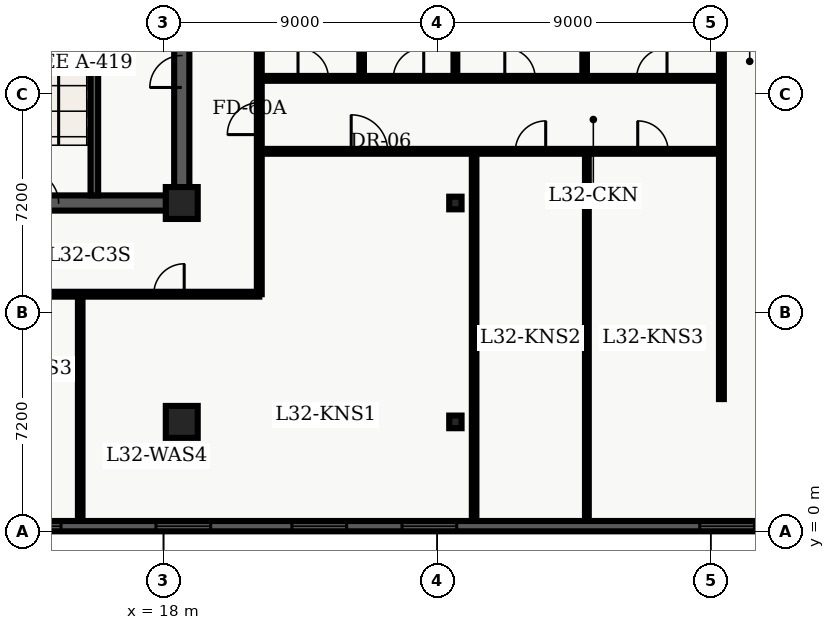
"""IFC4 building model, lengths in metres.
Left out: names, types, materials, properties, quantities, classifications, styles, units other than length and angle.
Written with IfcOpenShell. Run it as: python <this file> out.ifc"""

import sys

from ifc_helpers import new_model, entity, si_unit, converted_unit, direction, frame, origin_with_axes, origin_2d_with_axis, place, context, subcontext, project, spatial, polyline, rectangle, i_section, outline, extrude, element, fill, save


model = new_model("IFC4")
c1 = context("Model", 3, precision=1e-05, world=origin_with_axes(), true_north=direction((0.0, 1.0)))
c2 = subcontext(c1, "Body", "Model", "MODEL_VIEW")
j1 = project(units=[si_unit("LENGTHUNIT", "METRE"), converted_unit("PLANEANGLEUNIT", "DEGREE", entity("IfcPlaneAngleMeasure", 0.017), si_unit("PLANEANGLEUNIT", "RADIAN"), dimensions=[0, 0, 0, 0, 0, 0, 0])], contexts=[c1])
p1 = place(None, origin_with_axes())
s1 = spatial("IfcSite", under=j1, at=p1, CompositionType="ELEMENT")
p2 = place(p1, origin_with_axes())
s2 = spatial("IfcBuilding", under=s1, at=p2, CompositionType="ELEMENT")
p3 = place(p2, frame((0.0, 0.0, 132.9), z_axis=(0.0, 0.0, 1.0), x_axis=(1.0, 0.0, 0.0)))
s3 = spatial("IfcBuildingStorey", under=s2, at=p3, CompositionType="ELEMENT", Elevation=132.9)
p4 = place(p3, frame((11.4, 10.8, 0.0), z_axis=(0.0, 0.0, 1.0), x_axis=(1.0, 0.0, 0.0)))
e1 = element("IfcWall", 1, at=p4, inside=s3, PredefinedType="SHEAR", context=c2, shape_type="SweptSolid", body=[
    extrude(outline(polyline([(0.0, -0.25), (7.2, -0.25), (7.2, 0.25), (0.0, 0.25), (0.0, -0.25)])), origin_with_axes(), (0.0, 0.0, 1.0), 3.66),
])
p5 = place(p4, frame((2.625, 0.0, 0.0), z_axis=(0.0, 0.0, 1.0), x_axis=(1.0, 0.0, 0.0)))
e2 = element("IfcOpeningElement", 2, at=p5, cuts=e1, PredefinedType="OPENING", context=c2, shape_type="SweptSolid", body=[
    extrude(rectangle(XDim=1.05, YDim=0.52, at=origin_2d_with_axis()), origin_with_axes(), (0.0, 0.0, 1.0), 2.15),
])
p6 = place(p3, frame((18.6, 10.8, 0.0), z_axis=(0.0, 0.0, 1.0), x_axis=(0.0, 1.0, 0.0)))
e3 = element("IfcWall", 3, at=p6, inside=s3, PredefinedType="SHEAR", context=c2, shape_type="SweptSolid", body=[
    extrude(outline(polyline([(0.0, -0.25), (13.5, -0.25), (13.5, 0.25), (0.0, 0.25), (0.0, -0.25)])), origin_with_axes(), (0.0, 0.0, 1.0), 3.66),
])
p7 = place(p6, frame((11.125, 0.0, 0.0), z_axis=(0.0, 0.0, 1.0), x_axis=(1.0, 0.0, 0.0)))
e4 = element("IfcOpeningElement", 4, at=p7, cuts=e3, PredefinedType="OPENING", context=c2, shape_type="SweptSolid", body=[
    extrude(rectangle(XDim=1.05, YDim=0.52, at=origin_2d_with_axis()), origin_with_axes(), (0.0, 0.0, 1.0), 2.15),
])
p8 = place(p6, frame((4.325, 0.0, 0.0), z_axis=(0.0, 0.0, 1.0), x_axis=(1.0, 0.0, 0.0)))
e5 = element("IfcOpeningElement", 5, at=p8, cuts=e3, PredefinedType="OPENING", context=c2, shape_type="SweptSolid", body=[
    extrude(rectangle(XDim=1.05, YDim=0.52, at=origin_2d_with_axis()), origin_with_axes(), (0.0, 0.0, 1.0), 2.15),
])
p9 = place(p3, frame((15.725, 11.05, 0.0), z_axis=(0.0, 0.0, 1.0), x_axis=(0.0, 1.0, 0.0)))
e6 = element("IfcWall", 6, at=p9, inside=s3, PredefinedType="SHEAR", context=c2, shape_type="SweptSolid", body=[
    extrude(outline(polyline([(0.0, -0.125), (8.65, -0.125), (8.65, 0.125), (0.0, 0.125), (0.0, -0.125)])), origin_with_axes(), (0.0, 0.0, 1.0), 3.66),
])
for number, where, z_axis, x_axis in (
    (7, (18.6, 3.6, 0.0), (0.0, 0.0, 1.0), (1.0, 0.0, 0.0)),
    (8, (18.6, 10.8, 0.0), (0.0, 0.0, 1.0), (1.0, 0.0, 0.0)),
):
    element("IfcColumn", number, at=place(p3, frame(where, z_axis=z_axis, x_axis=x_axis)), inside=s3, PredefinedType="COLUMN", context=c2, shape_type="SweptSolid", body=[
        extrude(rectangle(XDim=1.05, YDim=1.05, at=origin_2d_with_axis()), origin_with_axes(), (0.0, 0.0, 1.0), 3.9),
    ])
for number, where, z_axis, x_axis in (
    (9, (27.6, 3.6, 0.0), (0.0, 0.0, 1.0), (1.0, 0.0, 0.0)),
    (10, (27.6, 10.8, 0.0), (0.0, 0.0, 1.0), (1.0, 0.0, 0.0)),
):
    element("IfcColumn", number, at=place(p3, frame(where, z_axis=z_axis, x_axis=x_axis)), inside=s3, PredefinedType="COLUMN", context=c2, shape_type="SweptSolid", body=[
        extrude(i_section(OverallWidth=0.406, OverallDepth=0.416, WebThickness=0.03, FlangeThickness=0.048, FilletRadius=0.022, at=origin_2d_with_axis()), origin_with_axes(), (0.0, 0.0, 1.0), 3.9),
    ])
p10 = place(p3, frame((2.6, 7.8, 0.0), z_axis=(0.0, 0.0, 1.0), x_axis=(1.0, 0.0, 0.0)))
e11 = element("IfcWall", 11, at=p10, inside=s3, PredefinedType="PARTITIONING", context=c2, shape_type="SweptSolid", body=[
    extrude(outline(polyline([(0.0, -0.08), (18.55, -0.08), (18.55, 0.08), (0.0, 0.08), (0.0, -0.08)])), origin_with_axes(), (0.0, 0.0, 1.0), 2.7),
])
p11 = place(p10, frame((1.55, 0.0, 0.0), z_axis=(0.0, 0.0, 1.0), x_axis=(1.0, 0.0, 0.0)))
e12 = element("IfcOpeningElement", 12, at=p11, cuts=e11, PredefinedType="OPENING", context=c2, shape_type="SweptSolid", body=[
    extrude(rectangle(XDim=1.0, YDim=0.18, at=origin_2d_with_axis()), origin_with_axes(), (0.0, 0.0, 1.0), 2.15),
])
p12 = place(p10, frame((6.235, 0.0, 0.0), z_axis=(0.0, 0.0, 1.0), x_axis=(1.0, 0.0, 0.0)))
e13 = element("IfcOpeningElement", 13, at=p12, cuts=e11, PredefinedType="OPENING", context=c2, shape_type="SweptSolid", body=[
    extrude(rectangle(XDim=1.0, YDim=0.18, at=origin_2d_with_axis()), origin_with_axes(), (0.0, 0.0, 1.0), 2.15),
])
p13 = place(p10, frame((10.73, 0.0, 0.0), z_axis=(0.0, 0.0, 1.0), x_axis=(1.0, 0.0, 0.0)))
e14 = element("IfcOpeningElement", 14, at=p13, cuts=e11, PredefinedType="OPENING", context=c2, shape_type="SweptSolid", body=[
    extrude(rectangle(XDim=1.0, YDim=0.18, at=origin_2d_with_axis()), origin_with_axes(), (0.0, 0.0, 1.0), 2.15),
])
p14 = place(p10, frame((15.58, 0.0, 0.0), z_axis=(0.0, 0.0, 1.0), x_axis=(1.0, 0.0, 0.0)))
e15 = element("IfcOpeningElement", 15, at=p14, cuts=e11, PredefinedType="OPENING", context=c2, shape_type="SweptSolid", body=[
    extrude(rectangle(XDim=1.0, YDim=0.18, at=origin_2d_with_axis()), origin_with_axes(), (0.0, 0.0, 1.0), 2.15),
])
p15 = place(p3, frame((21.15, 7.8, 0.0), z_axis=(0.0, 0.0, 1.0), x_axis=(0.0, 1.0, 0.0)))
e16 = element("IfcWall", 16, at=p15, inside=s3, PredefinedType="PARTITIONING", context=c2, shape_type="SweptSolid", body=[
    extrude(outline(polyline([(0.0, -0.08), (32.7, -0.08), (32.7, 0.08), (0.0, 0.08), (0.0, -0.08)])), origin_with_axes(), (0.0, 0.0, 1.0), 2.7),
])
p16 = place(p15, frame((5.775, 0.0, 0.0), z_axis=(0.0, 0.0, 1.0), x_axis=(1.0, 0.0, 0.0)))
e17 = element("IfcOpeningElement", 17, at=p16, cuts=e16, PredefinedType="OPENING", context=c2, shape_type="SweptSolid", body=[
    extrude(rectangle(XDim=1.05, YDim=0.18, at=origin_2d_with_axis()), origin_with_axes(), (0.0, 0.0, 1.0), 2.15),
])
p17 = place(p3, frame((15.26, 0.335, 0.0), z_axis=(0.0, 0.0, 1.0), x_axis=(0.0, 1.0, 0.0)))
e18 = element("IfcWall", 18, at=p17, inside=s3, PredefinedType="PARTITIONING", context=c2, shape_type="SweptSolid", body=[
    extrude(outline(polyline([(0.0, -0.075), (7.365, -0.075), (7.365, 0.075), (0.0, 0.075), (0.0, -0.075)])), origin_with_axes(), (0.0, 0.0, 1.0), 2.7),
])
p18 = place(p3, frame((21.15, 12.5, 0.0), z_axis=(0.0, 0.0, 1.0), x_axis=(1.0, 0.0, 0.0)))
e19 = element("IfcWall", 19, at=p18, inside=s3, PredefinedType="PARTITIONING", context=c2, shape_type="SweptSolid", body=[
    extrude(outline(polyline([(0.0, -0.08), (15.2, -0.08), (15.2, 0.08), (0.0, 0.08), (0.0, -0.08)])), origin_with_axes(), (0.0, 0.0, 1.0), 2.7),
])
p19 = place(p18, frame((3.623, 0.0, 0.0), z_axis=(0.0, 0.0, 1.0), x_axis=(1.0, 0.0, 0.0)))
e20 = element("IfcOpeningElement", 20, at=p19, cuts=e19, PredefinedType="OPENING", context=c2, shape_type="SweptSolid", body=[
    extrude(rectangle(XDim=1.2, YDim=0.18, at=origin_2d_with_axis()), origin_with_axes(), (0.0, 0.0, 1.0), 2.2),
])
p20 = place(p18, frame((8.921, 0.0, 0.0), z_axis=(0.0, 0.0, 1.0), x_axis=(1.0, 0.0, 0.0)))
e21 = element("IfcOpeningElement", 21, at=p20, cuts=e19, PredefinedType="OPENING", context=c2, shape_type="SweptSolid", body=[
    extrude(rectangle(XDim=1.0, YDim=0.18, at=origin_2d_with_axis()), origin_with_axes(), (0.0, 0.0, 1.0), 2.15),
])
p21 = place(p18, frame((12.947, 0.0, 0.0), z_axis=(0.0, 0.0, 1.0), x_axis=(1.0, 0.0, 0.0)))
e22 = element("IfcOpeningElement", 22, at=p21, cuts=e19, PredefinedType="OPENING", context=c2, shape_type="SweptSolid", body=[
    extrude(rectangle(XDim=1.0, YDim=0.18, at=origin_2d_with_axis()), origin_with_axes(), (0.0, 0.0, 1.0), 2.15),
])
p22 = place(p3, frame((21.15, 14.9, 0.0), z_axis=(0.0, 0.0, 1.0), x_axis=(1.0, 0.0, 0.0)))
e23 = element("IfcWall", 23, at=p22, inside=s3, PredefinedType="PARTITIONING", context=c2, shape_type="SweptSolid", body=[
    extrude(outline(polyline([(0.0, -0.08), (15.2, -0.08), (15.2, 0.08), (0.0, 0.08), (0.0, -0.08)])), origin_with_axes(), (0.0, 0.0, 1.0), 2.7),
])
p23 = place(p22, frame((1.774, 0.0, 0.0), z_axis=(0.0, 0.0, 1.0), x_axis=(1.0, 0.0, 0.0)))
e24 = element("IfcOpeningElement", 24, at=p23, cuts=e23, PredefinedType="OPENING", context=c2, shape_type="SweptSolid", body=[
    extrude(rectangle(XDim=1.0, YDim=0.18, at=origin_2d_with_axis()), origin_with_axes(), (0.0, 0.0, 1.0), 2.15),
])
p24 = place(p22, frame((4.909, 0.0, 0.0), z_axis=(0.0, 0.0, 1.0), x_axis=(1.0, 0.0, 0.0)))
e25 = element("IfcOpeningElement", 25, at=p24, cuts=e23, PredefinedType="OPENING", context=c2, shape_type="SweptSolid", body=[
    extrude(rectangle(XDim=1.0, YDim=0.18, at=origin_2d_with_axis()), origin_with_axes(), (0.0, 0.0, 1.0), 2.15),
])
p25 = place(p22, frame((8.575, 0.0, 0.0), z_axis=(0.0, 0.0, 1.0), x_axis=(1.0, 0.0, 0.0)))
e26 = element("IfcOpeningElement", 26, at=p25, cuts=e23, PredefinedType="OPENING", context=c2, shape_type="SweptSolid", body=[
    extrude(rectangle(XDim=1.0, YDim=0.18, at=origin_2d_with_axis()), origin_with_axes(), (0.0, 0.0, 1.0), 2.15),
])
p26 = place(p22, frame((12.911, 0.0, 0.0), z_axis=(0.0, 0.0, 1.0), x_axis=(1.0, 0.0, 0.0)))
e27 = element("IfcOpeningElement", 27, at=p26, cuts=e23, PredefinedType="OPENING", context=c2, shape_type="SweptSolid", body=[
    extrude(rectangle(XDim=1.0, YDim=0.18, at=origin_2d_with_axis()), origin_with_axes(), (0.0, 0.0, 1.0), 2.15),
])
p27 = place(p3, frame((36.35, 4.35, 0.0), z_axis=(0.0, 0.0, 1.0), x_axis=(0.0, 1.0, 0.0)))
e28 = element("IfcWall", 28, at=p27, inside=s3, PredefinedType="PARTITIONING", context=c2, shape_type="SweptSolid", body=[
    extrude(outline(polyline([(0.0, -0.08), (16.95, -0.08), (16.95, 0.08), (0.0, 0.08), (0.0, -0.08)])), origin_with_axes(), (0.0, 0.0, 1.0), 2.7),
])
p28 = place(p3, frame((28.216, 0.335, 0.0), z_axis=(0.0, 0.0, 1.0), x_axis=(0.0, 1.0, 0.0)))
e29 = element("IfcWall", 29, at=p28, inside=s3, PredefinedType="PARTITIONING", context=c2, shape_type="SweptSolid", body=[
    extrude(outline(polyline([(0.0, -0.075), (12.045, -0.075), (12.045, 0.075), (0.0, 0.075), (0.0, -0.075)])), origin_with_axes(), (0.0, 0.0, 1.0), 2.7),
])
p29 = place(p3, frame((31.925, 0.335, 0.0), z_axis=(0.0, 0.0, 1.0), x_axis=(0.0, 1.0, 0.0)))
e30 = element("IfcWall", 30, at=p29, inside=s3, PredefinedType="PARTITIONING", context=c2, shape_type="SweptSolid", body=[
    extrude(outline(polyline([(0.0, -0.062), (12.045, -0.062), (12.045, 0.062), (0.0, 0.062), (0.0, -0.062)])), origin_with_axes(), (0.0, 0.0, 1.0), 2.7),
])
p30 = place(p3, frame((24.517, 15.02, 0.0), z_axis=(0.0, 0.0, 1.0), x_axis=(0.0, 1.0, 0.0)))
e31 = element("IfcWall", 31, at=p30, inside=s3, PredefinedType="PARTITIONING", context=c2, shape_type="SweptSolid", body=[
    extrude(outline(polyline([(0.0, -0.075), (6.245, -0.075), (6.245, 0.075), (0.0, 0.075), (0.0, -0.075)])), origin_with_axes(), (0.0, 0.0, 1.0), 2.7),
])
p31 = place(p3, frame((27.6, 15.02, 0.0), z_axis=(0.0, 0.0, 1.0), x_axis=(0.0, 1.0, 0.0)))
e32 = element("IfcWall", 32, at=p31, inside=s3, PredefinedType="PARTITIONING", context=c2, shape_type="SweptSolid", body=[
    extrude(outline(polyline([(0.0, -0.062), (6.245, -0.062), (6.245, 0.062), (0.0, 0.062), (0.0, -0.062)])), origin_with_axes(), (0.0, 0.0, 1.0), 2.7),
])
p32 = place(p3, frame((31.851, 15.02, 0.0), z_axis=(0.0, 0.0, 1.0), x_axis=(0.0, 1.0, 0.0)))
e33 = element("IfcWall", 33, at=p32, inside=s3, PredefinedType="PARTITIONING", context=c2, shape_type="SweptSolid", body=[
    extrude(outline(polyline([(0.0, -0.075), (6.245, -0.075), (6.245, 0.075), (0.0, 0.075), (0.0, -0.075)])), origin_with_axes(), (0.0, 0.0, 1.0), 2.7),
])
p33 = place(p3, frame((57.26, 0.17, 0.0), z_axis=(0.0, 0.0, 1.0), x_axis=(-1.0, 0.0, 0.0)))
e34 = element("IfcWall", 34, at=p33, inside=s3, PredefinedType="SOLIDWALL", context=c2, shape_type="SweptSolid", body=[
    extrude(outline(polyline([(0.0, -0.17), (54.86, -0.17), (54.86, 0.17), (0.0, 0.17), (0.0, -0.17)])), origin_with_axes(), (0.0, 0.0, 1.0), 3.66),
])
p34 = place(p33, frame((2.836, 0.0, 0.45), z_axis=(0.0, 0.0, 1.0), x_axis=(1.0, 0.0, 0.0)))
e35 = element("IfcOpeningElement", 35, at=p34, cuts=e34, PredefinedType="OPENING", context=c2, shape_type="SweptSolid", body=[
    extrude(rectangle(XDim=1.8, YDim=0.36, at=origin_2d_with_axis()), origin_with_axes(), (0.0, 0.0, 1.0), 2.1),
])
p35 = place(p33, frame((7.307, 0.0, 0.45), z_axis=(0.0, 0.0, 1.0), x_axis=(1.0, 0.0, 0.0)))
e36 = element("IfcOpeningElement", 36, at=p35, cuts=e34, PredefinedType="OPENING", context=c2, shape_type="SweptSolid", body=[
    extrude(rectangle(XDim=1.8, YDim=0.36, at=origin_2d_with_axis()), origin_with_axes(), (0.0, 0.0, 1.0), 2.1),
])
p36 = place(p33, frame((11.779, 0.0, 0.45), z_axis=(0.0, 0.0, 1.0), x_axis=(1.0, 0.0, 0.0)))
e37 = element("IfcOpeningElement", 37, at=p36, cuts=e34, PredefinedType="OPENING", context=c2, shape_type="SweptSolid", body=[
    extrude(rectangle(XDim=1.8, YDim=0.36, at=origin_2d_with_axis()), origin_with_axes(), (0.0, 0.0, 1.0), 2.1),
])
p37 = place(p33, frame((16.251, 0.0, 0.45), z_axis=(0.0, 0.0, 1.0), x_axis=(1.0, 0.0, 0.0)))
e38 = element("IfcOpeningElement", 38, at=p37, cuts=e34, PredefinedType="OPENING", context=c2, shape_type="SweptSolid", body=[
    extrude(rectangle(XDim=1.8, YDim=0.36, at=origin_2d_with_axis()), origin_with_axes(), (0.0, 0.0, 1.0), 2.1),
])
p38 = place(p33, frame((20.723, 0.0, 0.45), z_axis=(0.0, 0.0, 1.0), x_axis=(1.0, 0.0, 0.0)))
e39 = element("IfcOpeningElement", 39, at=p38, cuts=e34, PredefinedType="OPENING", context=c2, shape_type="SweptSolid", body=[
    extrude(rectangle(XDim=1.8, YDim=0.36, at=origin_2d_with_axis()), origin_with_axes(), (0.0, 0.0, 1.0), 2.1),
])
p39 = place(p33, frame((30.516, 0.0, 0.45), z_axis=(0.0, 0.0, 1.0), x_axis=(1.0, 0.0, 0.0)))
e40 = element("IfcOpeningElement", 40, at=p39, cuts=e34, PredefinedType="OPENING", context=c2, shape_type="SweptSolid", body=[
    extrude(rectangle(XDim=1.8, YDim=0.36, at=origin_2d_with_axis()), origin_with_axes(), (0.0, 0.0, 1.0), 2.1),
])
p40 = place(p33, frame((34.138, 0.0, 0.45), z_axis=(0.0, 0.0, 1.0), x_axis=(1.0, 0.0, 0.0)))
e41 = element("IfcOpeningElement", 41, at=p40, cuts=e34, PredefinedType="OPENING", context=c2, shape_type="SweptSolid", body=[
    extrude(rectangle(XDim=1.8, YDim=0.36, at=origin_2d_with_axis()), origin_with_axes(), (0.0, 0.0, 1.0), 2.1),
])
p41 = place(p33, frame((38.609, 0.0, 0.45), z_axis=(0.0, 0.0, 1.0), x_axis=(1.0, 0.0, 0.0)))
e42 = element("IfcOpeningElement", 42, at=p41, cuts=e34, PredefinedType="OPENING", context=c2, shape_type="SweptSolid", body=[
    extrude(rectangle(XDim=1.8, YDim=0.36, at=origin_2d_with_axis()), origin_with_axes(), (0.0, 0.0, 1.0), 2.1),
])
p42 = place(p33, frame((43.531, 0.0, 0.45), z_axis=(0.0, 0.0, 1.0), x_axis=(1.0, 0.0, 0.0)))
e43 = element("IfcOpeningElement", 43, at=p42, cuts=e34, PredefinedType="OPENING", context=c2, shape_type="SweptSolid", body=[
    extrude(rectangle(XDim=1.8, YDim=0.36, at=origin_2d_with_axis()), origin_with_axes(), (0.0, 0.0, 1.0), 2.1),
])
p43 = place(p33, frame((47.553, 0.0, 0.45), z_axis=(0.0, 0.0, 1.0), x_axis=(1.0, 0.0, 0.0)))
e44 = element("IfcOpeningElement", 44, at=p43, cuts=e34, PredefinedType="OPENING", context=c2, shape_type="SweptSolid", body=[
    extrude(rectangle(XDim=1.8, YDim=0.36, at=origin_2d_with_axis()), origin_with_axes(), (0.0, 0.0, 1.0), 2.1),
])
p44 = place(p33, frame((52.474, 0.0, 0.45), z_axis=(0.0, 0.0, 1.0), x_axis=(1.0, 0.0, 0.0)))
e45 = element("IfcOpeningElement", 45, at=p44, cuts=e34, PredefinedType="OPENING", context=c2, shape_type="SweptSolid", body=[
    extrude(rectangle(XDim=1.8, YDim=0.36, at=origin_2d_with_axis()), origin_with_axes(), (0.0, 0.0, 1.0), 2.1),
])
p45 = place(p4, frame((2.625, 0.0, 0.0), z_axis=(0.0, 0.0, 1.0), x_axis=(1.0, 0.0, 0.0)))
e46 = element("IfcDoor", 46, at=p45, inside=s3, OperationType="SINGLE_SWING_LEFT", PredefinedType="DOOR", context=c2, shape_type="SweptSolid", body=[
    extrude(rectangle(XDim=1.05, YDim=0.09, at=origin_2d_with_axis()), origin_with_axes(), (0.0, 0.0, 1.0), 2.15),
])
fill(e2, e46)
p46 = place(p6, frame((4.325, 0.0, 0.0), z_axis=(0.0, 0.0, 1.0), x_axis=(1.0, 0.0, 0.0)))
e47 = element("IfcDoor", 47, at=p46, inside=s3, OperationType="SINGLE_SWING_LEFT", PredefinedType="DOOR", context=c2, shape_type="SweptSolid", body=[
    extrude(rectangle(XDim=1.05, YDim=0.09, at=origin_2d_with_axis()), origin_with_axes(), (0.0, 0.0, 1.0), 2.15),
])
fill(e5, e47)
p47 = place(p10, frame((15.58, 0.0, 0.0), z_axis=(0.0, 0.0, 1.0), x_axis=(1.0, 0.0, 0.0)))
e48 = element("IfcDoor", 48, at=p47, inside=s3, OperationType="SINGLE_SWING_RIGHT", PredefinedType="DOOR", context=c2, shape_type="SweptSolid", body=[
    extrude(rectangle(XDim=1.0, YDim=0.09, at=origin_2d_with_axis()), origin_with_axes(), (0.0, 0.0, 1.0), 2.15),
])
fill(e15, e48)
p48 = place(p15, frame((5.775, 0.0, 0.0), z_axis=(0.0, 0.0, 1.0), x_axis=(1.0, 0.0, 0.0)))
e49 = element("IfcDoor", 49, at=p48, inside=s3, OperationType="SINGLE_SWING_LEFT", PredefinedType="DOOR", context=c2, shape_type="SweptSolid", body=[
    extrude(rectangle(XDim=1.05, YDim=0.09, at=origin_2d_with_axis()), origin_with_axes(), (0.0, 0.0, 1.0), 2.15),
])
fill(e17, e49)
p49 = place(p18, frame((3.623, 0.0, 0.0), z_axis=(0.0, 0.0, 1.0), x_axis=(1.0, 0.0, 0.0)))
e50 = element("IfcDoor", 50, at=p49, inside=s3, OperationType="SINGLE_SWING_LEFT", PredefinedType="DOOR", context=c2, shape_type="SweptSolid", body=[
    extrude(rectangle(XDim=1.2, YDim=0.09, at=origin_2d_with_axis()), origin_with_axes(), (0.0, 0.0, 1.0), 2.2),
])
fill(e20, e50)
p50 = place(p18, frame((8.921, 0.0, 0.0), z_axis=(0.0, 0.0, 1.0), x_axis=(1.0, 0.0, 0.0)))
e51 = element("IfcDoor", 51, at=p50, inside=s3, OperationType="SINGLE_SWING_RIGHT", PredefinedType="DOOR", context=c2, shape_type="SweptSolid", body=[
    extrude(rectangle(XDim=1.0, YDim=0.09, at=origin_2d_with_axis()), origin_with_axes(), (0.0, 0.0, 1.0), 2.15),
])
fill(e21, e51)
p51 = place(p18, frame((12.947, 0.0, 0.0), z_axis=(0.0, 0.0, 1.0), x_axis=(1.0, 0.0, 0.0)))
e52 = element("IfcDoor", 52, at=p51, inside=s3, OperationType="SINGLE_SWING_LEFT", PredefinedType="DOOR", context=c2, shape_type="SweptSolid", body=[
    extrude(rectangle(XDim=1.0, YDim=0.09, at=origin_2d_with_axis()), origin_with_axes(), (0.0, 0.0, 1.0), 2.15),
])
fill(e22, e52)
p52 = place(p22, frame((1.774, 0.0, 0.0), z_axis=(0.0, 0.0, 1.0), x_axis=(1.0, 0.0, 0.0)))
e53 = element("IfcDoor", 53, at=p52, inside=s3, OperationType="SINGLE_SWING_LEFT", PredefinedType="DOOR", context=c2, shape_type="SweptSolid", body=[
    extrude(rectangle(XDim=1.0, YDim=0.09, at=origin_2d_with_axis()), origin_with_axes(), (0.0, 0.0, 1.0), 2.15),
])
fill(e24, e53)
p53 = place(p22, frame((4.909, 0.0, 0.0), z_axis=(0.0, 0.0, 1.0), x_axis=(1.0, 0.0, 0.0)))
e54 = element("IfcDoor", 54, at=p53, inside=s3, OperationType="SINGLE_SWING_RIGHT", PredefinedType="DOOR", context=c2, shape_type="SweptSolid", body=[
    extrude(rectangle(XDim=1.0, YDim=0.09, at=origin_2d_with_axis()), origin_with_axes(), (0.0, 0.0, 1.0), 2.15),
])
fill(e25, e54)
p54 = place(p22, frame((8.575, 0.0, 0.0), z_axis=(0.0, 0.0, 1.0), x_axis=(1.0, 0.0, 0.0)))
e55 = element("IfcDoor", 55, at=p54, inside=s3, OperationType="SINGLE_SWING_LEFT", PredefinedType="DOOR", context=c2, shape_type="SweptSolid", body=[
    extrude(rectangle(XDim=1.0, YDim=0.09, at=origin_2d_with_axis()), origin_with_axes(), (0.0, 0.0, 1.0), 2.15),
])
fill(e26, e55)
p55 = place(p22, frame((12.911, 0.0, 0.0), z_axis=(0.0, 0.0, 1.0), x_axis=(1.0, 0.0, 0.0)))
e56 = element("IfcDoor", 56, at=p55, inside=s3, OperationType="SINGLE_SWING_RIGHT", PredefinedType="DOOR", context=c2, shape_type="SweptSolid", body=[
    extrude(rectangle(XDim=1.0, YDim=0.09, at=origin_2d_with_axis()), origin_with_axes(), (0.0, 0.0, 1.0), 2.15),
])
fill(e27, e56)
p56 = place(p33, frame((20.723, 0.0, 0.45), z_axis=(0.0, 0.0, 1.0), x_axis=(1.0, 0.0, 0.0)))
e57 = element("IfcWindow", 57, at=p56, inside=s3, PredefinedType="WINDOW", context=c2, shape_type="SweptSolid", body=[
    extrude(rectangle(XDim=1.8, YDim=0.09, at=origin_2d_with_axis()), origin_with_axes(), (0.0, 0.0, 1.0), 2.1),
])
fill(e39, e57)
p57 = place(p33, frame((30.516, 0.0, 0.45), z_axis=(0.0, 0.0, 1.0), x_axis=(1.0, 0.0, 0.0)))
e58 = element("IfcWindow", 58, at=p57, inside=s3, PredefinedType="WINDOW", context=c2, shape_type="SweptSolid", body=[
    extrude(rectangle(XDim=1.8, YDim=0.09, at=origin_2d_with_axis()), origin_with_axes(), (0.0, 0.0, 1.0), 2.1),
])
fill(e40, e58)
p58 = place(p33, frame((34.138, 0.0, 0.45), z_axis=(0.0, 0.0, 1.0), x_axis=(1.0, 0.0, 0.0)))
e59 = element("IfcWindow", 59, at=p58, inside=s3, PredefinedType="WINDOW", context=c2, shape_type="SweptSolid", body=[
    extrude(rectangle(XDim=1.8, YDim=0.09, at=origin_2d_with_axis()), origin_with_axes(), (0.0, 0.0, 1.0), 2.1),
])
fill(e41, e59)
p59 = place(p33, frame((38.609, 0.0, 0.45), z_axis=(0.0, 0.0, 1.0), x_axis=(1.0, 0.0, 0.0)))
e60 = element("IfcWindow", 60, at=p59, inside=s3, PredefinedType="WINDOW", context=c2, shape_type="SweptSolid", body=[
    extrude(rectangle(XDim=1.8, YDim=0.09, at=origin_2d_with_axis()), origin_with_axes(), (0.0, 0.0, 1.0), 2.1),
])
fill(e42, e60)
p60 = place(p33, frame((43.531, 0.0, 0.45), z_axis=(0.0, 0.0, 1.0), x_axis=(1.0, 0.0, 0.0)))
e61 = element("IfcWindow", 61, at=p60, inside=s3, PredefinedType="WINDOW", context=c2, shape_type="SweptSolid", body=[
    extrude(rectangle(XDim=1.8, YDim=0.09, at=origin_2d_with_axis()), origin_with_axes(), (0.0, 0.0, 1.0), 2.1),
])
fill(e43, e61)
save(model, sys.argv[1])
